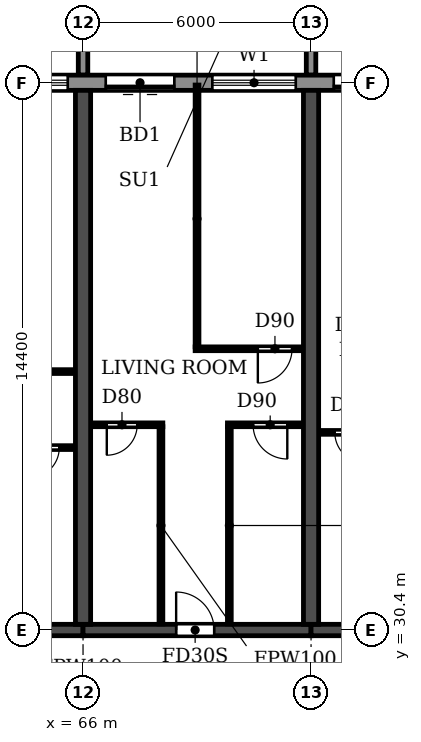
"""IFC4 building model, lengths in metres.
Left out: names, types, materials, properties, quantities, classifications, styles, units other than length and angle.
Written with IfcOpenShell. Run it as: python <this file> out.ifc"""

import sys

from ifc_helpers import new_model, si_unit, direction, frame, frame_2d, origin, place, context, subcontext, project, spatial, polyline, rectangle, outline, extrude, source, transform, mapped, element, fill, save


model = new_model("IFC4")
c1 = context("Model", 3, precision=1e-05, world=origin(), true_north=direction((0.0, 1.0)))
c2 = subcontext(c1, "Body", "Model", "MODEL_VIEW")
j1 = project(units=[si_unit("LENGTHUNIT", "METRE"), si_unit("PLANEANGLEUNIT", "RADIAN")], contexts=[c1])
p1 = place(None, origin())
s1 = spatial("IfcSite", under=j1, at=p1, CompositionType="ELEMENT")
p2 = place(p1, origin())
s2 = spatial("IfcBuilding", under=s1, at=p2, CompositionType="ELEMENT")
p3 = place(p2, frame((0.0, 0.0, 63.0)))
s3 = spatial("IfcBuildingStorey", under=s2, at=p3, CompositionType="ELEMENT", Elevation=63.0)
for number, where, z_axis, x_axis in (
    (1, (66.0, 30.55, 0.0), (0.0, 0.0, 1.0), (0.0, 1.0, 0.0)),
    (2, (72.0, 30.55, 0.0), (0.0, 0.0, 1.0), (0.0, 1.0, 0.0)),
):
    element("IfcWall", number, at=place(p3, frame(where, z_axis=z_axis, x_axis=x_axis)), inside=s3, PredefinedType="SHEAR", context=c2, shape_type="SweptSolid", body=[
        extrude(rectangle(XDim=14.05, YDim=0.4, at=frame_2d((7.025, 0.0))), origin(), (0.0, 0.0, 1.0), 2.95),
    ])
p4 = place(p3, frame((60.0, 30.4, 0.0), z_axis=(0.0, 0.0, 1.0), x_axis=(1.0, 0.0, 0.0)))
e3 = element("IfcWall", 3, at=p4, inside=s3, PredefinedType="SHEAR", context=c2, shape_type="SweptSolid", body=[
    extrude(rectangle(XDim=6.0, YDim=0.3, at=frame_2d((3.0, 0.0))), origin(), (0.0, 0.0, 1.0), 2.35),
])
p5 = place(p4, frame((2.55, 0.0, 0.0)))
e4 = element("IfcOpeningElement", 4, at=p5, cuts=e3, PredefinedType="OPENING", context=c2, shape_type="SweptSolid", body=[
    extrude(rectangle(XDim=1.0, YDim=2.1, at=frame_2d((0.5, 1.05))), frame((0.0, 0.16, 0.0), z_axis=(0.0, -1.0, 0.0), x_axis=(1.0, 0.0, 0.0)), (0.0, 0.0, 1.0), 0.32),
])
p6 = place(p3, frame((66.0, 30.4, 0.0), z_axis=(0.0, 0.0, 1.0), x_axis=(1.0, 0.0, 0.0)))
e5 = element("IfcWall", 5, at=p6, inside=s3, PredefinedType="SHEAR", context=c2, shape_type="SweptSolid", body=[
    extrude(rectangle(XDim=6.0, YDim=0.3, at=frame_2d((3.0, 0.0))), origin(), (0.0, 0.0, 1.0), 2.35),
])
p7 = place(p6, frame((2.45, 0.0, 0.0)))
e6 = element("IfcOpeningElement", 6, at=p7, cuts=e5, PredefinedType="OPENING", context=c2, shape_type="SweptSolid", body=[
    extrude(rectangle(XDim=1.0, YDim=2.1, at=frame_2d((0.5, 1.05))), frame((0.0, 0.16, 0.0), z_axis=(0.0, -1.0, 0.0), x_axis=(1.0, 0.0, 0.0)), (0.0, 0.0, 1.0), 0.32),
])
p8 = place(p3, frame((72.0, 30.4, 0.0), z_axis=(0.0, 0.0, 1.0), x_axis=(1.0, 0.0, 0.0)))
e7 = element("IfcWall", 7, at=p8, inside=s3, PredefinedType="SHEAR", context=c2, shape_type="SweptSolid", body=[
    extrude(rectangle(XDim=6.0, YDim=0.3, at=frame_2d((3.0, 0.0))), origin(), (0.0, 0.0, 1.0), 2.35),
])
p9 = place(p8, frame((2.45, 0.0, 0.0)))
e8 = element("IfcOpeningElement", 8, at=p9, cuts=e7, PredefinedType="OPENING", context=c2, shape_type="SweptSolid", body=[
    extrude(rectangle(XDim=1.0, YDim=2.1, at=frame_2d((0.5, 1.05))), frame((0.0, 0.16, 0.0), z_axis=(0.0, -1.0, 0.0), x_axis=(1.0, 0.0, 0.0)), (0.0, 0.0, 1.0), 0.32),
])
p10 = place(p3, frame((91.317, 44.8, 0.0), z_axis=(0.0, 0.0, 1.0), x_axis=(-1.0, 0.0, 0.0)))
e9 = element("IfcWall", 9, at=p10, inside=s3, PredefinedType="STANDARD", context=c2, shape_type="SweptSolid", body=[
    extrude(rectangle(XDim=80.634, YDim=0.4, at=frame_2d((40.317, 0.0))), origin(), (0.0, 0.0, 1.0), 2.95),
])
p11 = place(p10, frame((76.717, 0.0, 0.9)))
e10 = element("IfcOpeningElement", 10, at=p11, cuts=e9, PredefinedType="OPENING", context=c2, shape_type="SweptSolid", body=[
    extrude(rectangle(XDim=2.2, YDim=1.5, at=frame_2d((1.1, 0.75))), frame((0.0, 0.21, 0.0), z_axis=(0.0, -1.0, 0.0), x_axis=(1.0, 0.0, 0.0)), (0.0, 0.0, 1.0), 0.42),
])
p12 = place(p10, frame((73.917, 0.0, 0.0)))
e11 = element("IfcOpeningElement", 11, at=p12, cuts=e9, PredefinedType="OPENING", context=c2, shape_type="SweptSolid", body=[
    extrude(rectangle(XDim=1.8, YDim=2.4, at=frame_2d((0.9, 1.2))), frame((0.0, 0.21, 0.0), z_axis=(0.0, -1.0, 0.0), x_axis=(1.0, 0.0, 0.0)), (0.0, 0.0, 1.0), 0.42),
])
p13 = place(p10, frame((70.717, 0.0, 0.9)))
e12 = element("IfcOpeningElement", 12, at=p13, cuts=e9, PredefinedType="OPENING", context=c2, shape_type="SweptSolid", body=[
    extrude(rectangle(XDim=2.2, YDim=1.5, at=frame_2d((1.1, 0.75))), frame((0.0, 0.21, 0.0), z_axis=(0.0, -1.0, 0.0), x_axis=(1.0, 0.0, 0.0)), (0.0, 0.0, 1.0), 0.42),
])
p14 = place(p10, frame((67.917, 0.0, 0.0)))
e13 = element("IfcOpeningElement", 13, at=p14, cuts=e9, PredefinedType="OPENING", context=c2, shape_type="SweptSolid", body=[
    extrude(rectangle(XDim=1.8, YDim=2.4, at=frame_2d((0.9, 1.2))), frame((0.0, 0.21, 0.0), z_axis=(0.0, -1.0, 0.0), x_axis=(1.0, 0.0, 0.0)), (0.0, 0.0, 1.0), 0.42),
])
p15 = place(p10, frame((64.717, 0.0, 0.9)))
e14 = element("IfcOpeningElement", 14, at=p15, cuts=e9, PredefinedType="OPENING", context=c2, shape_type="SweptSolid", body=[
    extrude(rectangle(XDim=2.2, YDim=1.5, at=frame_2d((1.1, 0.75))), frame((0.0, 0.21, 0.0), z_axis=(0.0, -1.0, 0.0), x_axis=(1.0, 0.0, 0.0)), (0.0, 0.0, 1.0), 0.42),
])
p16 = place(p10, frame((61.917, 0.0, 0.0)))
e15 = element("IfcOpeningElement", 15, at=p16, cuts=e9, PredefinedType="OPENING", context=c2, shape_type="SweptSolid", body=[
    extrude(rectangle(XDim=1.8, YDim=2.4, at=frame_2d((0.9, 1.2))), frame((0.0, 0.21, 0.0), z_axis=(0.0, -1.0, 0.0), x_axis=(1.0, 0.0, 0.0)), (0.0, 0.0, 1.0), 0.42),
])
p17 = place(p10, frame((58.717, 0.0, 0.9)))
e16 = element("IfcOpeningElement", 16, at=p17, cuts=e9, PredefinedType="OPENING", context=c2, shape_type="SweptSolid", body=[
    extrude(rectangle(XDim=2.2, YDim=1.5, at=frame_2d((1.1, 0.75))), frame((0.0, 0.21, 0.0), z_axis=(0.0, -1.0, 0.0), x_axis=(1.0, 0.0, 0.0)), (0.0, 0.0, 1.0), 0.42),
])
p18 = place(p10, frame((55.717, 0.0, 0.9)))
e17 = element("IfcOpeningElement", 17, at=p18, cuts=e9, PredefinedType="OPENING", context=c2, shape_type="SweptSolid", body=[
    extrude(rectangle(XDim=2.2, YDim=1.5, at=frame_2d((1.1, 0.75))), frame((0.0, 0.21, 0.0), z_axis=(0.0, -1.0, 0.0), x_axis=(1.0, 0.0, 0.0)), (0.0, 0.0, 1.0), 0.42),
])
p19 = place(p10, frame((52.917, 0.0, 0.0)))
e18 = element("IfcOpeningElement", 18, at=p19, cuts=e9, PredefinedType="OPENING", context=c2, shape_type="SweptSolid", body=[
    extrude(rectangle(XDim=1.8, YDim=2.4, at=frame_2d((0.9, 1.2))), frame((0.0, 0.21, 0.0), z_axis=(0.0, -1.0, 0.0), x_axis=(1.0, 0.0, 0.0)), (0.0, 0.0, 1.0), 0.42),
])
p20 = place(p10, frame((49.717, 0.0, 0.9)))
e19 = element("IfcOpeningElement", 19, at=p20, cuts=e9, PredefinedType="OPENING", context=c2, shape_type="SweptSolid", body=[
    extrude(rectangle(XDim=2.2, YDim=1.5, at=frame_2d((1.1, 0.75))), frame((0.0, 0.21, 0.0), z_axis=(0.0, -1.0, 0.0), x_axis=(1.0, 0.0, 0.0)), (0.0, 0.0, 1.0), 0.42),
])
p21 = place(p10, frame((46.917, 0.0, 0.0)))
e20 = element("IfcOpeningElement", 20, at=p21, cuts=e9, PredefinedType="OPENING", context=c2, shape_type="SweptSolid", body=[
    extrude(rectangle(XDim=1.8, YDim=2.4, at=frame_2d((0.9, 1.2))), frame((0.0, 0.21, 0.0), z_axis=(0.0, -1.0, 0.0), x_axis=(1.0, 0.0, 0.0)), (0.0, 0.0, 1.0), 0.42),
])
p22 = place(p10, frame((43.717, 0.0, 0.9)))
e21 = element("IfcOpeningElement", 21, at=p22, cuts=e9, PredefinedType="OPENING", context=c2, shape_type="SweptSolid", body=[
    extrude(rectangle(XDim=2.2, YDim=1.5, at=frame_2d((1.1, 0.75))), frame((0.0, 0.21, 0.0), z_axis=(0.0, -1.0, 0.0), x_axis=(1.0, 0.0, 0.0)), (0.0, 0.0, 1.0), 0.42),
])
p23 = place(p10, frame((40.717, 0.0, 0.9)))
e22 = element("IfcOpeningElement", 22, at=p23, cuts=e9, PredefinedType="OPENING", context=c2, shape_type="SweptSolid", body=[
    extrude(rectangle(XDim=2.2, YDim=1.5, at=frame_2d((1.1, 0.75))), frame((0.0, 0.21, 0.0), z_axis=(0.0, -1.0, 0.0), x_axis=(1.0, 0.0, 0.0)), (0.0, 0.0, 1.0), 0.42),
])
p24 = place(p10, frame((37.717, 0.0, 0.9)))
e23 = element("IfcOpeningElement", 23, at=p24, cuts=e9, PredefinedType="OPENING", context=c2, shape_type="SweptSolid", body=[
    extrude(rectangle(XDim=2.2, YDim=1.5, at=frame_2d((1.1, 0.75))), frame((0.0, 0.21, 0.0), z_axis=(0.0, -1.0, 0.0), x_axis=(1.0, 0.0, 0.0)), (0.0, 0.0, 1.0), 0.42),
])
p25 = place(p10, frame((34.717, 0.0, 0.9)))
e24 = element("IfcOpeningElement", 24, at=p25, cuts=e9, PredefinedType="OPENING", context=c2, shape_type="SweptSolid", body=[
    extrude(rectangle(XDim=2.2, YDim=1.5, at=frame_2d((1.1, 0.75))), frame((0.0, 0.21, 0.0), z_axis=(0.0, -1.0, 0.0), x_axis=(1.0, 0.0, 0.0)), (0.0, 0.0, 1.0), 0.42),
])
p26 = place(p10, frame((31.917, 0.0, 0.0)))
e25 = element("IfcOpeningElement", 25, at=p26, cuts=e9, PredefinedType="OPENING", context=c2, shape_type="SweptSolid", body=[
    extrude(rectangle(XDim=1.8, YDim=2.4, at=frame_2d((0.9, 1.2))), frame((0.0, 0.21, 0.0), z_axis=(0.0, -1.0, 0.0), x_axis=(1.0, 0.0, 0.0)), (0.0, 0.0, 1.0), 0.42),
])
p27 = place(p10, frame((28.917, 0.0, 0.0)))
e26 = element("IfcOpeningElement", 26, at=p27, cuts=e9, PredefinedType="OPENING", context=c2, shape_type="SweptSolid", body=[
    extrude(rectangle(XDim=1.8, YDim=2.4, at=frame_2d((0.9, 1.2))), frame((0.0, 0.21, 0.0), z_axis=(0.0, -1.0, 0.0), x_axis=(1.0, 0.0, 0.0)), (0.0, 0.0, 1.0), 0.42),
])
p28 = place(p10, frame((25.717, 0.0, 0.9)))
e27 = element("IfcOpeningElement", 27, at=p28, cuts=e9, PredefinedType="OPENING", context=c2, shape_type="SweptSolid", body=[
    extrude(rectangle(XDim=2.2, YDim=1.5, at=frame_2d((1.1, 0.75))), frame((0.0, 0.21, 0.0), z_axis=(0.0, -1.0, 0.0), x_axis=(1.0, 0.0, 0.0)), (0.0, 0.0, 1.0), 0.42),
])
p29 = place(p10, frame((22.917, 0.0, 0.0)))
e28 = element("IfcOpeningElement", 28, at=p29, cuts=e9, PredefinedType="OPENING", context=c2, shape_type="SweptSolid", body=[
    extrude(rectangle(XDim=1.8, YDim=2.4, at=frame_2d((0.9, 1.2))), frame((0.0, 0.21, 0.0), z_axis=(0.0, -1.0, 0.0), x_axis=(1.0, 0.0, 0.0)), (0.0, 0.0, 1.0), 0.42),
])
p30 = place(p10, frame((19.717, 0.0, 0.9)))
e29 = element("IfcOpeningElement", 29, at=p30, cuts=e9, PredefinedType="OPENING", context=c2, shape_type="SweptSolid", body=[
    extrude(rectangle(XDim=2.2, YDim=1.5, at=frame_2d((1.1, 0.75))), frame((0.0, 0.21, 0.0), z_axis=(0.0, -1.0, 0.0), x_axis=(1.0, 0.0, 0.0)), (0.0, 0.0, 1.0), 0.42),
])
p31 = place(p10, frame((16.917, 0.0, 0.0)))
e30 = element("IfcOpeningElement", 30, at=p31, cuts=e9, PredefinedType="OPENING", context=c2, shape_type="SweptSolid", body=[
    extrude(rectangle(XDim=1.8, YDim=2.4, at=frame_2d((0.9, 1.2))), frame((0.0, 0.21, 0.0), z_axis=(0.0, -1.0, 0.0), x_axis=(1.0, 0.0, 0.0)), (0.0, 0.0, 1.0), 0.42),
])
p32 = place(p10, frame((13.717, 0.0, 0.9)))
e31 = element("IfcOpeningElement", 31, at=p32, cuts=e9, PredefinedType="OPENING", context=c2, shape_type="SweptSolid", body=[
    extrude(rectangle(XDim=2.2, YDim=1.5, at=frame_2d((1.1, 0.75))), frame((0.0, 0.21, 0.0), z_axis=(0.0, -1.0, 0.0), x_axis=(1.0, 0.0, 0.0)), (0.0, 0.0, 1.0), 0.42),
])
p33 = place(p10, frame((10.917, 0.0, 0.0)))
e32 = element("IfcOpeningElement", 32, at=p33, cuts=e9, PredefinedType="OPENING", context=c2, shape_type="SweptSolid", body=[
    extrude(rectangle(XDim=1.8, YDim=2.4, at=frame_2d((0.9, 1.2))), frame((0.0, 0.21, 0.0), z_axis=(0.0, -1.0, 0.0), x_axis=(1.0, 0.0, 0.0)), (0.0, 0.0, 1.0), 0.42),
])
p34 = place(p10, frame((7.717, 0.0, 0.9)))
e33 = element("IfcOpeningElement", 33, at=p34, cuts=e9, PredefinedType="OPENING", context=c2, shape_type="SweptSolid", body=[
    extrude(rectangle(XDim=2.2, YDim=1.5, at=frame_2d((1.1, 0.75))), frame((0.0, 0.21, 0.0), z_axis=(0.0, -1.0, 0.0), x_axis=(1.0, 0.0, 0.0)), (0.0, 0.0, 1.0), 0.42),
])
p35 = place(p10, frame((4.717, 0.0, 0.9)))
e34 = element("IfcOpeningElement", 34, at=p35, cuts=e9, PredefinedType="OPENING", context=c2, shape_type="SweptSolid", body=[
    extrude(rectangle(XDim=2.2, YDim=1.5, at=frame_2d((1.1, 0.75))), frame((0.0, 0.21, 0.0), z_axis=(0.0, -1.0, 0.0), x_axis=(1.0, 0.0, 0.0)), (0.0, 0.0, 1.0), 0.42),
])
p36 = place(p10, frame((1.717, 0.0, 0.9)))
e35 = element("IfcOpeningElement", 35, at=p36, cuts=e9, PredefinedType="OPENING", context=c2, shape_type="SweptSolid", body=[
    extrude(rectangle(XDim=2.2, YDim=1.5, at=frame_2d((1.1, 0.75))), frame((0.0, 0.21, 0.0), z_axis=(0.0, -1.0, 0.0), x_axis=(1.0, 0.0, 0.0)), (0.0, 0.0, 1.0), 0.42),
])
m1 = source(origin(), c2, "Body", "SweptSolid", [
    extrude(outline(polyline([(0.0, 0.0), (0.25, 0.0), (0.25, 3.1), (0.0, 3.1), (0.0, 0.0)])), origin(), (0.0, 0.0, 1.0), 3.1),
])
for number, where in (
    (36, (65.875, 45.0, 0.0)),
    (37, (71.875, 45.0, 0.0)),
):
    element("IfcWall", number, at=place(p3, frame(where)), inside=s3, PredefinedType="STANDARD", context=c2, shape_type="MappedRepresentation", body=[
        mapped(m1, transform((0.0, 0.0, 0.0))),
    ])
p37 = place(p3, frame((63.9, 35.2, 0.0), z_axis=(0.0, 0.0, 1.0), x_axis=(1.0, 0.0, 0.0)))
e38 = element("IfcWall", 38, at=p37, inside=s3, PredefinedType="PARTITIONING", context=c2, shape_type="SweptSolid", body=[
    extrude(rectangle(XDim=1.89, YDim=0.1, at=frame_2d((0.945, 0.0))), origin(), (0.0, 0.0, 1.0), 2.95),
])
p38 = place(p37, frame((0.675, 0.0, 0.0)))
e39 = element("IfcOpeningElement", 39, at=p38, cuts=e38, PredefinedType="OPENING", context=c2, shape_type="SweptSolid", body=[
    extrude(rectangle(XDim=0.8, YDim=2.1, at=frame_2d((0.4, 1.05))), frame((0.0, 0.06, 0.0), z_axis=(0.0, -1.0, 0.0), x_axis=(1.0, 0.0, 0.0)), (0.0, 0.0, 1.0), 0.12),
])
p39 = place(p3, frame((72.21, 35.6, 0.0), z_axis=(0.0, 0.0, 1.0), x_axis=(1.0, 0.0, 0.0)))
e40 = element("IfcWall", 40, at=p39, inside=s3, PredefinedType="PARTITIONING", context=c2, shape_type="SweptSolid", body=[
    extrude(rectangle(XDim=1.89, YDim=0.1, at=frame_2d((0.945, 0.0))), origin(), (0.0, 0.0, 1.0), 2.95),
])
p40 = place(p39, frame((0.415, 0.0, 0.0)))
e41 = element("IfcOpeningElement", 41, at=p40, cuts=e40, PredefinedType="OPENING", context=c2, shape_type="SweptSolid", body=[
    extrude(rectangle(XDim=0.8, YDim=2.1, at=frame_2d((0.4, 1.05))), frame((0.0, 0.06, 0.0), z_axis=(0.0, -1.0, 0.0), x_axis=(1.0, 0.0, 0.0)), (0.0, 0.0, 1.0), 0.12),
])
p41 = place(p3, frame((66.21, 35.8, 0.0), z_axis=(0.0, 0.0, 1.0), x_axis=(1.0, 0.0, 0.0)))
e42 = element("IfcWall", 42, at=p41, inside=s3, PredefinedType="PARTITIONING", context=c2, shape_type="SweptSolid", body=[
    extrude(rectangle(XDim=1.89, YDim=0.1, at=frame_2d((0.945, 0.0))), origin(), (0.0, 0.0, 1.0), 2.95),
])
p42 = place(p41, frame((0.415, 0.0, 0.0)))
e43 = element("IfcOpeningElement", 43, at=p42, cuts=e42, PredefinedType="OPENING", context=c2, shape_type="SweptSolid", body=[
    extrude(rectangle(XDim=0.8, YDim=2.1, at=frame_2d((0.4, 1.05))), frame((0.0, 0.06, 0.0), z_axis=(0.0, -1.0, 0.0), x_axis=(1.0, 0.0, 0.0)), (0.0, 0.0, 1.0), 0.12),
])
p43 = place(p3, frame((69.8, 35.8, 0.0), z_axis=(0.0, 0.0, 1.0), x_axis=(1.0, 0.0, 0.0)))
e44 = element("IfcWall", 44, at=p43, inside=s3, PredefinedType="PARTITIONING", context=c2, shape_type="SweptSolid", body=[
    extrude(rectangle(XDim=1.99, YDim=0.1, at=frame_2d((0.995, 0.0))), origin(), (0.0, 0.0, 1.0), 2.95),
])
p44 = place(p43, frame((0.675, 0.0, 0.0)))
e45 = element("IfcOpeningElement", 45, at=p44, cuts=e44, PredefinedType="OPENING", context=c2, shape_type="SweptSolid", body=[
    extrude(rectangle(XDim=0.9, YDim=2.1, at=frame_2d((0.45, 1.05))), frame((0.0, 0.06, 0.0), z_axis=(0.0, -1.0, 0.0), x_axis=(1.0, 0.0, 0.0)), (0.0, 0.0, 1.0), 0.12),
])
p45 = place(p3, frame((62.95, 37.2, 0.0), z_axis=(0.0, 0.0, 1.0), x_axis=(1.0, 0.0, 0.0)))
e46 = element("IfcWall", 46, at=p45, inside=s3, PredefinedType="PARTITIONING", context=c2, shape_type="SweptSolid", body=[
    extrude(rectangle(XDim=2.84, YDim=0.1, at=frame_2d((1.42, 0.0))), origin(), (0.0, 0.0, 1.0), 2.95),
])
p46 = place(p45, frame((0.55, 0.0, 0.0)))
e47 = element("IfcOpeningElement", 47, at=p46, cuts=e46, PredefinedType="OPENING", context=c2, shape_type="SweptSolid", body=[
    extrude(rectangle(XDim=0.9, YDim=2.1, at=frame_2d((0.45, 1.05))), frame((0.0, 0.06, 0.0), z_axis=(0.0, -1.0, 0.0), x_axis=(1.0, 0.0, 0.0)), (0.0, 0.0, 1.0), 0.12),
])
p47 = place(p3, frame((68.95, 37.8, 0.0), z_axis=(0.0, 0.0, 1.0), x_axis=(1.0, 0.0, 0.0)))
e48 = element("IfcWall", 48, at=p47, inside=s3, PredefinedType="PARTITIONING", context=c2, shape_type="SweptSolid", body=[
    extrude(rectangle(XDim=2.84, YDim=0.1, at=frame_2d((1.42, 0.0))), origin(), (0.0, 0.0, 1.0), 2.95),
])
p48 = place(p47, frame((1.65, 0.0, 0.0)))
e49 = element("IfcOpeningElement", 49, at=p48, cuts=e48, PredefinedType="OPENING", context=c2, shape_type="SweptSolid", body=[
    extrude(rectangle(XDim=0.9, YDim=2.1, at=frame_2d((0.45, 1.05))), frame((0.0, 0.06, 0.0), z_axis=(0.0, -1.0, 0.0), x_axis=(1.0, 0.0, 0.0)), (0.0, 0.0, 1.0), 0.12),
])
p49 = place(p3, frame((68.05, 30.56, 0.0), z_axis=(0.0, 0.0, 1.0), x_axis=(0.0, 1.0, 0.0)))
e50 = element("IfcWall", 50, at=p49, inside=s3, PredefinedType="PARTITIONING", context=c2, shape_type="SweptSolid", body=[
    extrude(rectangle(XDim=5.19, YDim=0.1, at=frame_2d((2.595, 0.0))), origin(), (0.0, 0.0, 1.0), 2.95),
])
p50 = place(p3, frame((69.0, 37.85, 0.0), z_axis=(0.0, 0.0, 1.0), x_axis=(0.0, 1.0, 0.0)))
e51 = element("IfcWall", 51, at=p50, inside=s3, PredefinedType="PARTITIONING", context=c2, shape_type="SweptSolid", body=[
    extrude(rectangle(XDim=6.89, YDim=0.1, at=frame_2d((3.445, 0.0))), origin(), (0.0, 0.0, 1.0), 2.95),
])
p51 = place(p3, frame((69.85, 30.56, 0.0), z_axis=(0.0, 0.0, 1.0), x_axis=(0.0, 1.0, 0.0)))
e52 = element("IfcWall", 52, at=p51, inside=s3, PredefinedType="PARTITIONING", context=c2, shape_type="SweptSolid", body=[
    extrude(rectangle(XDim=5.19, YDim=0.1, at=frame_2d((2.595, 0.0))), origin(), (0.0, 0.0, 1.0), 2.95),
])
p52 = place(p28, origin())
e53 = element("IfcWindow", 53, at=p52, inside=s3, PartitioningType="DOUBLE_PANEL_HORIZONTAL", PredefinedType="WINDOW", context=c2, shape_type="SweptSolid", body=[
    extrude(rectangle(XDim=2.2, YDim=1.5, at=frame_2d((1.1, 0.75))), frame((0.0, 0.03, 0.0), z_axis=(0.0, -1.0, 0.0), x_axis=(1.0, 0.0, 0.0)), (0.0, 0.0, 1.0), 0.06),
])
fill(e27, e53)
p53 = place(p29, origin())
e54 = element("IfcDoor", 54, at=p53, inside=s3, OperationType="DOUBLE_DOOR_SLIDING", PredefinedType="DOOR", context=c2, shape_type="SweptSolid", body=[
    extrude(rectangle(XDim=1.8, YDim=2.4, at=frame_2d((0.9, 1.2))), frame((0.0, 0.025, 0.0), z_axis=(0.0, -1.0, 0.0), x_axis=(1.0, 0.0, 0.0)), (0.0, 0.0, 1.0), 0.05),
])
fill(e28, e54)
p54 = place(p30, origin())
e55 = element("IfcWindow", 55, at=p54, inside=s3, PartitioningType="DOUBLE_PANEL_HORIZONTAL", PredefinedType="WINDOW", context=c2, shape_type="SweptSolid", body=[
    extrude(rectangle(XDim=2.2, YDim=1.5, at=frame_2d((1.1, 0.75))), frame((0.0, 0.03, 0.0), z_axis=(0.0, -1.0, 0.0), x_axis=(1.0, 0.0, 0.0)), (0.0, 0.0, 1.0), 0.06),
])
fill(e29, e55)
p55 = place(p31, origin())
e56 = element("IfcDoor", 56, at=p55, inside=s3, OperationType="DOUBLE_DOOR_SLIDING", PredefinedType="DOOR", context=c2, shape_type="SweptSolid", body=[
    extrude(rectangle(XDim=1.8, YDim=2.4, at=frame_2d((0.9, 1.2))), frame((0.0, 0.025, 0.0), z_axis=(0.0, -1.0, 0.0), x_axis=(1.0, 0.0, 0.0)), (0.0, 0.0, 1.0), 0.05),
])
fill(e30, e56)
p56 = place(p38, frame((0.8, 0.0, 0.0), z_axis=(0.0, 0.0, 1.0), x_axis=(-1.0, 0.0, 0.0)))
e57 = element("IfcDoor", 57, at=p56, inside=s3, OperationType="SINGLE_SWING_RIGHT", PredefinedType="DOOR", context=c2, shape_type="SweptSolid", body=[
    extrude(rectangle(XDim=0.8, YDim=2.1, at=frame_2d((0.4, 1.05))), frame((0.0, 0.025, 0.0), z_axis=(0.0, -1.0, 0.0), x_axis=(1.0, 0.0, 0.0)), (0.0, 0.0, 1.0), 0.05),
])
fill(e39, e57)
p57 = place(p42, frame((0.8, 0.0, 0.0), z_axis=(0.0, 0.0, 1.0), x_axis=(-1.0, 0.0, 0.0)))
e58 = element("IfcDoor", 58, at=p57, inside=s3, OperationType="SINGLE_SWING_RIGHT", PredefinedType="DOOR", context=c2, shape_type="SweptSolid", body=[
    extrude(rectangle(XDim=0.8, YDim=2.1, at=frame_2d((0.4, 1.05))), frame((0.0, 0.025, 0.0), z_axis=(0.0, -1.0, 0.0), x_axis=(1.0, 0.0, 0.0)), (0.0, 0.0, 1.0), 0.05),
])
fill(e43, e58)
p58 = place(p7, origin())
e59 = element("IfcDoor", 59, at=p58, inside=s3, OperationType="SINGLE_SWING_LEFT", PredefinedType="DOOR", context=c2, shape_type="SweptSolid", body=[
    extrude(rectangle(XDim=1.0, YDim=2.1, at=frame_2d((0.5, 1.05))), frame((0.0, 0.025, 0.0), z_axis=(0.0, -1.0, 0.0), x_axis=(1.0, 0.0, 0.0)), (0.0, 0.0, 1.0), 0.05),
])
fill(e6, e59)
p59 = place(p44, frame((0.9, 0.0, 0.0), z_axis=(0.0, 0.0, 1.0), x_axis=(-1.0, 0.0, 0.0)))
e60 = element("IfcDoor", 60, at=p59, inside=s3, OperationType="SINGLE_SWING_LEFT", PredefinedType="DOOR", context=c2, shape_type="SweptSolid", body=[
    extrude(rectangle(XDim=0.9, YDim=2.1, at=frame_2d((0.45, 1.05))), frame((0.0, 0.025, 0.0), z_axis=(0.0, -1.0, 0.0), x_axis=(1.0, 0.0, 0.0)), (0.0, 0.0, 1.0), 0.05),
])
fill(e45, e60)
p60 = place(p48, frame((0.9, 0.0, 0.0), z_axis=(0.0, 0.0, 1.0), x_axis=(-1.0, 0.0, 0.0)))
e61 = element("IfcDoor", 61, at=p60, inside=s3, OperationType="SINGLE_SWING_RIGHT", PredefinedType="DOOR", context=c2, shape_type="SweptSolid", body=[
    extrude(rectangle(XDim=0.9, YDim=2.1, at=frame_2d((0.45, 1.05))), frame((0.0, 0.025, 0.0), z_axis=(0.0, -1.0, 0.0), x_axis=(1.0, 0.0, 0.0)), (0.0, 0.0, 1.0), 0.05),
])
fill(e49, e61)
p61 = place(p40, frame((0.8, 0.0, 0.0), z_axis=(0.0, 0.0, 1.0), x_axis=(-1.0, 0.0, 0.0)))
e62 = element("IfcDoor", 62, at=p61, inside=s3, OperationType="SINGLE_SWING_LEFT", PredefinedType="DOOR", context=c2, shape_type="SweptSolid", body=[
    extrude(rectangle(XDim=0.8, YDim=2.1, at=frame_2d((0.4, 1.05))), frame((0.0, 0.025, 0.0), z_axis=(0.0, -1.0, 0.0), x_axis=(1.0, 0.0, 0.0)), (0.0, 0.0, 1.0), 0.05),
])
fill(e41, e62)
save(model, sys.argv[1])
